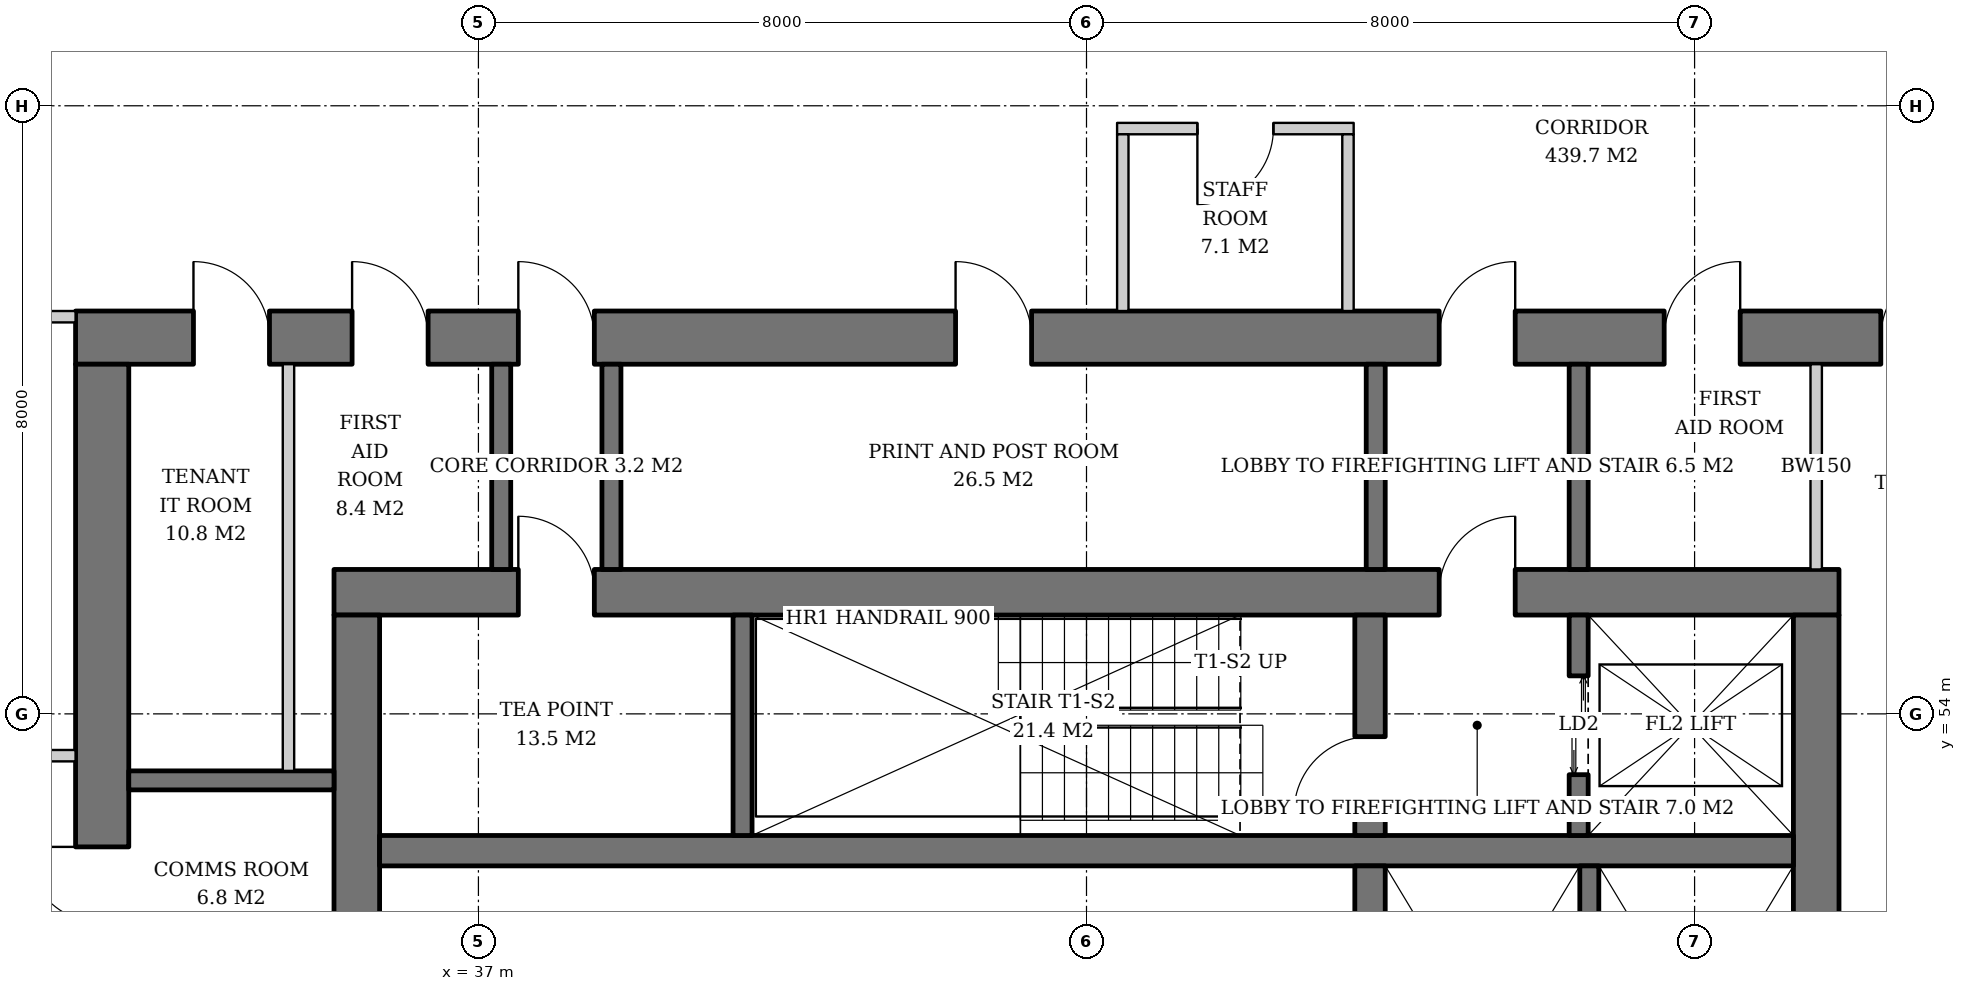
"""IFC4 building model, lengths in metres.
Left out: names, types, materials, properties, quantities, classifications, styles, units other than length and angle.
Written with IfcOpenShell. Run it as: python <this file> out.ifc"""

import sys

from ifc_helpers import new_model, si_unit, direction, frame, frame_2d, origin, place, context, subcontext, project, spatial, rectangle, extrude, element, fill, save


model = new_model("IFC4")
c1 = context("Model", 3, precision=1e-05, world=origin(), true_north=direction((0.0, 1.0)))
c2 = subcontext(c1, "Body", "Model", "MODEL_VIEW")
j1 = project(units=[si_unit("LENGTHUNIT", "METRE"), si_unit("PLANEANGLEUNIT", "RADIAN")], contexts=[c1])
p1 = place(None, origin())
s1 = spatial("IfcSite", under=j1, at=p1, CompositionType="ELEMENT")
p2 = place(p1, origin())
s2 = spatial("IfcBuilding", under=s1, at=p2, CompositionType="ELEMENT")
p3 = place(p2, frame((0.0, 0.0, 116.0)))
s3 = spatial("IfcBuildingStorey", under=s2, at=p3, CompositionType="ELEMENT", Elevation=116.0)
p4 = place(p3, frame((35.1, 55.6, 0.0), z_axis=(0.0, 0.0, 1.0), x_axis=(1.0, 0.0, 0.0)))
e1 = element("IfcWall", 1, at=p4, inside=s3, PredefinedType="SHEAR", context=c2, shape_type="SweptSolid", body=[
    extrude(rectangle(XDim=19.8, YDim=0.6, at=frame_2d((9.9, 0.0))), origin(), (0.0, 0.0, 1.0), 3.8),
])
p5 = place(p4, frame((14.54, 0.0, 0.0)))
e2 = element("IfcOpeningElement", 2, at=p5, cuts=e1, PredefinedType="OPENING", context=c2, shape_type="SweptSolid", body=[
    extrude(rectangle(XDim=1.0, YDim=2.1, at=frame_2d((0.5, 1.05))), frame((0.0, 0.31, 0.0), z_axis=(0.0, -1.0, 0.0), x_axis=(1.0, 0.0, 0.0)), (0.0, 0.0, 1.0), 0.62),
])
p6 = place(p4, frame((2.425, 0.0, 0.0)))
e3 = element("IfcOpeningElement", 3, at=p6, cuts=e1, PredefinedType="OPENING", context=c2, shape_type="SweptSolid", body=[
    extrude(rectangle(XDim=1.0, YDim=2.1, at=frame_2d((0.5, 1.05))), frame((0.0, 0.31, 0.0), z_axis=(0.0, -1.0, 0.0), x_axis=(1.0, 0.0, 0.0)), (0.0, 0.0, 1.0), 0.62),
])
p7 = place(p3, frame((35.4, 36.7, 0.0), z_axis=(0.0, 0.0, 1.0), x_axis=(0.0, 1.0, 0.0)))
e4 = element("IfcWall", 4, at=p7, inside=s3, PredefinedType="SHEAR", context=c2, shape_type="SweptSolid", body=[
    extrude(rectangle(XDim=18.6, YDim=0.6, at=frame_2d((9.3, 0.0))), origin(), (0.0, 0.0, 1.0), 3.8),
])
p8 = place(p7, frame((8.4, 0.0, 0.0)))
e5 = element("IfcOpeningElement", 5, at=p8, cuts=e4, PredefinedType="OPENING", context=c2, shape_type="SweptSolid", body=[
    extrude(rectangle(XDim=1.8, YDim=2.4, at=frame_2d((0.9, 1.2))), frame((0.0, 0.31, 0.0), z_axis=(0.0, -1.0, 0.0), x_axis=(1.0, 0.0, 0.0)), (0.0, 0.0, 1.0), 0.62),
])
p9 = place(p3, frame((54.6, 36.7, 0.0), z_axis=(0.0, 0.0, 1.0), x_axis=(0.0, 1.0, 0.0)))
e6 = element("IfcWall", 6, at=p9, inside=s3, PredefinedType="SHEAR", context=c2, shape_type="SweptSolid", body=[
    extrude(rectangle(XDim=18.6, YDim=0.6, at=frame_2d((9.3, 0.0))), origin(), (0.0, 0.0, 1.0), 3.8),
])
p10 = place(p9, frame((8.4, 0.0, 0.0)))
e7 = element("IfcOpeningElement", 7, at=p10, cuts=e6, PredefinedType="OPENING", context=c2, shape_type="SweptSolid", body=[
    extrude(rectangle(XDim=1.8, YDim=2.4, at=frame_2d((0.9, 1.2))), frame((0.0, 0.31, 0.0), z_axis=(0.0, -1.0, 0.0), x_axis=(1.0, 0.0, 0.0)), (0.0, 0.0, 1.0), 0.62),
])
p11 = place(p3, frame((31.7, 58.95, 0.0), z_axis=(0.0, 0.0, 1.0), x_axis=(1.0, 0.0, 0.0)))
e8 = element("IfcWall", 8, at=p11, inside=s3, PredefinedType="SHEAR", context=c2, shape_type="SweptSolid", body=[
    extrude(rectangle(XDim=26.6, YDim=0.7, at=frame_2d((13.3, 0.0))), origin(), (0.0, 0.0, 1.0), 3.8),
])
p12 = place(p11, frame((17.94, 0.0, 0.0)))
e9 = element("IfcOpeningElement", 9, at=p12, cuts=e8, PredefinedType="OPENING", context=c2, shape_type="SweptSolid", body=[
    extrude(rectangle(XDim=1.0, YDim=2.1, at=frame_2d((0.5, 1.05))), frame((0.0, 0.36, 0.0), z_axis=(0.0, -1.0, 0.0), x_axis=(1.0, 0.0, 0.0)), (0.0, 0.0, 1.0), 0.72),
])
p13 = place(p11, frame((5.825, 0.0, 0.0)))
e10 = element("IfcOpeningElement", 10, at=p13, cuts=e8, PredefinedType="OPENING", context=c2, shape_type="SweptSolid", body=[
    extrude(rectangle(XDim=1.0, YDim=2.1, at=frame_2d((0.5, 1.05))), frame((0.0, 0.36, 0.0), z_axis=(0.0, -1.0, 0.0), x_axis=(1.0, 0.0, 0.0)), (0.0, 0.0, 1.0), 0.72),
])
p14 = place(p11, frame((1.551, 0.0, 0.0)))
e11 = element("IfcOpeningElement", 11, at=p14, cuts=e8, PredefinedType="OPENING", context=c2, shape_type="SweptSolid", body=[
    extrude(rectangle(XDim=1.0, YDim=2.1, at=frame_2d((0.5, 1.05))), frame((0.0, 0.36, 0.0), z_axis=(0.0, -1.0, 0.0), x_axis=(1.0, 0.0, 0.0)), (0.0, 0.0, 1.0), 0.72),
])
p15 = place(p11, frame((3.638, 0.0, 0.0)))
e12 = element("IfcOpeningElement", 12, at=p15, cuts=e8, PredefinedType="OPENING", context=c2, shape_type="SweptSolid", body=[
    extrude(rectangle(XDim=1.0, YDim=2.1, at=frame_2d((0.5, 1.05))), frame((0.0, 0.36, 0.0), z_axis=(0.0, -1.0, 0.0), x_axis=(1.0, 0.0, 0.0)), (0.0, 0.0, 1.0), 0.72),
])
p16 = place(p11, frame((11.577, 0.0, 0.0)))
e13 = element("IfcOpeningElement", 13, at=p16, cuts=e8, PredefinedType="OPENING", context=c2, shape_type="SweptSolid", body=[
    extrude(rectangle(XDim=1.0, YDim=2.1, at=frame_2d((0.5, 1.05))), frame((0.0, 0.36, 0.0), z_axis=(0.0, -1.0, 0.0), x_axis=(1.0, 0.0, 0.0)), (0.0, 0.0, 1.0), 0.72),
])
p17 = place(p11, frame((20.9, 0.0, 0.0)))
e14 = element("IfcOpeningElement", 14, at=p17, cuts=e8, PredefinedType="OPENING", context=c2, shape_type="SweptSolid", body=[
    extrude(rectangle(XDim=1.0, YDim=2.1, at=frame_2d((0.5, 1.05))), frame((0.0, 0.36, 0.0), z_axis=(0.0, -1.0, 0.0), x_axis=(1.0, 0.0, 0.0)), (0.0, 0.0, 1.0), 0.72),
])
p18 = place(p11, frame((23.75, 0.0, 0.0)))
e15 = element("IfcOpeningElement", 15, at=p18, cuts=e8, PredefinedType="OPENING", context=c2, shape_type="SweptSolid", body=[
    extrude(rectangle(XDim=1.0, YDim=2.1, at=frame_2d((0.5, 1.05))), frame((0.0, 0.36, 0.0), z_axis=(0.0, -1.0, 0.0), x_axis=(1.0, 0.0, 0.0)), (0.0, 0.0, 1.0), 0.72),
])
p19 = place(p3, frame((32.05, 33.4, 0.0), z_axis=(0.0, 0.0, 1.0), x_axis=(0.0, 1.0, 0.0)))
e16 = element("IfcWall", 16, at=p19, inside=s3, PredefinedType="SHEAR", context=c2, shape_type="SweptSolid", body=[
    extrude(rectangle(XDim=25.2, YDim=0.7, at=frame_2d((12.6, 0.0))), origin(), (0.0, 0.0, 1.0), 3.8),
])
p20 = place(p19, frame((11.7, 0.0, 0.0)))
e17 = element("IfcOpeningElement", 17, at=p20, cuts=e16, PredefinedType="OPENING", context=c2, shape_type="SweptSolid", body=[
    extrude(rectangle(XDim=1.8, YDim=2.4, at=frame_2d((0.9, 1.2))), frame((0.0, 0.36, 0.0), z_axis=(0.0, -1.0, 0.0), x_axis=(1.0, 0.0, 0.0)), (0.0, 0.0, 1.0), 0.72),
])
p21 = place(p19, frame((3.6, 0.0, 0.0)))
e18 = element("IfcOpeningElement", 18, at=p21, cuts=e16, PredefinedType="OPENING", context=c2, shape_type="SweptSolid", body=[
    extrude(rectangle(XDim=1.0, YDim=2.1, at=frame_2d((0.5, 1.05))), frame((0.0, 0.36, 0.0), z_axis=(0.0, -1.0, 0.0), x_axis=(1.0, 0.0, 0.0)), (0.0, 0.0, 1.0), 0.72),
])
p22 = place(p19, frame((6.35, 0.0, 0.0)))
e19 = element("IfcOpeningElement", 19, at=p22, cuts=e16, PredefinedType="OPENING", context=c2, shape_type="SweptSolid", body=[
    extrude(rectangle(XDim=1.0, YDim=2.1, at=frame_2d((0.5, 1.05))), frame((0.0, 0.36, 0.0), z_axis=(0.0, -1.0, 0.0), x_axis=(1.0, 0.0, 0.0)), (0.0, 0.0, 1.0), 0.72),
])
p23 = place(p19, frame((9.1, 0.0, 0.0)))
e20 = element("IfcOpeningElement", 20, at=p23, cuts=e16, PredefinedType="OPENING", context=c2, shape_type="SweptSolid", body=[
    extrude(rectangle(XDim=1.0, YDim=2.1, at=frame_2d((0.5, 1.05))), frame((0.0, 0.36, 0.0), z_axis=(0.0, -1.0, 0.0), x_axis=(1.0, 0.0, 0.0)), (0.0, 0.0, 1.0), 0.72),
])
p24 = place(p19, frame((15.1, 0.0, 0.0)))
e21 = element("IfcOpeningElement", 21, at=p24, cuts=e16, PredefinedType="OPENING", context=c2, shape_type="SweptSolid", body=[
    extrude(rectangle(XDim=1.0, YDim=2.1, at=frame_2d((0.5, 1.05))), frame((0.0, 0.36, 0.0), z_axis=(0.0, -1.0, 0.0), x_axis=(1.0, 0.0, 0.0)), (0.0, 0.0, 1.0), 0.72),
])
p25 = place(p19, frame((17.85, 0.0, 0.0)))
e22 = element("IfcOpeningElement", 22, at=p25, cuts=e16, PredefinedType="OPENING", context=c2, shape_type="SweptSolid", body=[
    extrude(rectangle(XDim=1.0, YDim=2.1, at=frame_2d((0.5, 1.05))), frame((0.0, 0.36, 0.0), z_axis=(0.0, -1.0, 0.0), x_axis=(1.0, 0.0, 0.0)), (0.0, 0.0, 1.0), 0.72),
])
p26 = place(p3, frame((35.7, 52.2, 0.0), z_axis=(0.0, 0.0, 1.0), x_axis=(1.0, 0.0, 0.0)))
e23 = element("IfcWall", 23, at=p26, inside=s3, PredefinedType="SHEAR", context=c2, shape_type="SweptSolid", body=[
    extrude(rectangle(XDim=18.6, YDim=0.4, at=frame_2d((9.3, 0.0))), origin(), (0.0, 0.0, 1.0), 3.8),
])
p27 = place(p3, frame((48.73, 40.0, 0.0), z_axis=(0.0, 0.0, 1.0), x_axis=(0.0, 1.0, 0.0)))
e24 = element("IfcWall", 24, at=p27, inside=s3, PredefinedType="SHEAR", context=c2, shape_type="SweptSolid", body=[
    extrude(rectangle(XDim=12.0, YDim=0.4, at=frame_2d((6.0, 0.0))), origin(), (0.0, 0.0, 1.0), 3.8),
])
p28 = place(p3, frame((48.73, 52.4, 0.0), z_axis=(0.0, 0.0, 1.0), x_axis=(0.0, 1.0, 0.0)))
e25 = element("IfcWall", 25, at=p28, inside=s3, PredefinedType="SHEAR", context=c2, shape_type="SweptSolid", body=[
    extrude(rectangle(XDim=2.9, YDim=0.4, at=frame_2d((1.45, 0.0))), origin(), (0.0, 0.0, 1.0), 3.8),
])
p29 = place(p28, frame((0.3, 0.0, 0.0)))
e26 = element("IfcOpeningElement", 26, at=p29, cuts=e25, PredefinedType="OPENING", context=c2, shape_type="SweptSolid", body=[
    extrude(rectangle(XDim=1.0, YDim=2.1, at=frame_2d((0.5, 1.05))), frame((0.0, 0.21, 0.0), z_axis=(0.0, -1.0, 0.0), x_axis=(1.0, 0.0, 0.0)), (0.0, 0.0, 1.0), 0.42),
])
p30 = place(p3, frame((40.475, 52.4, 0.0), z_axis=(0.0, 0.0, 1.0), x_axis=(0.0, 1.0, 0.0)))
e27 = element("IfcWall", 27, at=p30, inside=s3, PredefinedType="SHEAR", context=c2, shape_type="SweptSolid", body=[
    extrude(rectangle(XDim=2.9, YDim=0.25, at=frame_2d((1.45, 0.0))), origin(), (0.0, 0.0, 1.0), 3.8),
])
p31 = place(p3, frame((51.475, 52.4, 0.0), z_axis=(0.0, 0.0, 1.0), x_axis=(0.0, 1.0, 0.0)))
e28 = element("IfcWall", 28, at=p31, inside=s3, PredefinedType="SHEAR", context=c2, shape_type="SweptSolid", body=[
    extrude(rectangle(XDim=2.9, YDim=0.25, at=frame_2d((1.45, 0.0))), origin(), (0.0, 0.0, 1.0), 3.8),
])
p32 = place(p31, frame((0.8, 0.0, 0.0)))
e29 = element("IfcOpeningElement", 29, at=p32, cuts=e28, PredefinedType="OPENING", context=c2, shape_type="SweptSolid", body=[
    extrude(rectangle(XDim=1.3, YDim=2.2, at=frame_2d((0.65, 1.1))), frame((0.0, 0.135, 0.0), z_axis=(0.0, -1.0, 0.0), x_axis=(1.0, 0.0, 0.0)), (0.0, 0.0, 1.0), 0.27),
])
p33 = place(p3, frame((51.615, 47.75, 0.0), z_axis=(0.0, 0.0, 1.0), x_axis=(0.0, 1.0, 0.0)))
e30 = element("IfcWall", 30, at=p33, inside=s3, PredefinedType="SHEAR", context=c2, shape_type="SweptSolid", body=[
    extrude(rectangle(XDim=4.25, YDim=0.25, at=frame_2d((2.125, 0.0))), origin(), (0.0, 0.0, 1.0), 3.8),
])
p34 = place(p3, frame((32.4, 53.125, 0.0), z_axis=(0.0, 0.0, 1.0), x_axis=(1.0, 0.0, 0.0)))
e31 = element("IfcWall", 31, at=p34, inside=s3, PredefinedType="SHEAR", context=c2, shape_type="SweptSolid", body=[
    extrude(rectangle(XDim=2.7, YDim=0.25, at=frame_2d((1.35, 0.0))), origin(), (0.0, 0.0, 1.0), 3.8),
])
for number, where, z_axis, x_axis in (
    (32, (48.805, 55.9, 0.0), (0.0, 0.0, 1.0), (0.0, 1.0, 0.0)),
    (33, (51.475, 55.9, 0.0), (0.0, 0.0, 1.0), (0.0, 1.0, 0.0)),
    (34, (37.3, 55.9, 0.0), (0.0, 0.0, 1.0), (0.0, 1.0, 0.0)),
    (35, (38.75, 55.9, 0.0), (0.0, 0.0, 1.0), (0.0, 1.0, 0.0)),
):
    element("IfcWall", number, at=place(p3, frame(where, z_axis=z_axis, x_axis=x_axis)), inside=s3, PredefinedType="SOLIDWALL", context=c2, shape_type="SweptSolid", body=[
        extrude(rectangle(XDim=2.7, YDim=0.25, at=frame_2d((1.35, 0.0))), origin(), (0.0, 0.0, 1.0), 3.62),
    ])
p35 = place(p3, frame((34.501, 53.25, 0.0), z_axis=(0.0, 0.0, 1.0), x_axis=(0.0, 1.0, 0.0)))
e36 = element("IfcWall", 36, at=p35, inside=s3, PredefinedType="SOLIDWALL", context=c2, shape_type="SweptSolid", body=[
    extrude(rectangle(XDim=5.35, YDim=0.15, at=frame_2d((2.675, 0.0))), origin(), (0.0, 0.0, 1.0), 3.62),
])
p36 = place(p3, frame((54.6, 55.9, 0.0), z_axis=(0.0, 0.0, 1.0), x_axis=(0.0, 1.0, 0.0)))
e37 = element("IfcWall", 37, at=p36, inside=s3, PredefinedType="SOLIDWALL", context=c2, shape_type="SweptSolid", body=[
    extrude(rectangle(XDim=2.7, YDim=0.15, at=frame_2d((1.35, 0.0))), origin(), (0.0, 0.0, 1.0), 3.62),
])
p37 = place(p3, frame((48.515, 61.7, 0.0), z_axis=(0.0, 0.0, 1.0), x_axis=(-1.0, 0.0, 0.0)))
e38 = element("IfcWall", 38, at=p37, inside=s3, PredefinedType="PARTITIONING", context=c2, shape_type="SweptSolid", body=[
    extrude(rectangle(XDim=3.112, YDim=0.15, at=frame_2d((1.556, 0.0))), origin(), (0.0, 0.0, 1.0), 2.858),
])
p38 = place(p37, frame((1.056, 0.0, 0.0)))
e39 = element("IfcOpeningElement", 39, at=p38, cuts=e38, PredefinedType="OPENING", context=c2, shape_type="SweptSolid", body=[
    extrude(rectangle(XDim=1.0, YDim=2.1, at=frame_2d((0.5, 1.05))), frame((0.0, 0.085, 0.0), z_axis=(0.0, -1.0, 0.0), x_axis=(1.0, 0.0, 0.0)), (0.0, 0.0, 1.0), 0.17),
])
p39 = place(p3, frame((48.44, 59.3, 0.0), z_axis=(0.0, 0.0, 1.0), x_axis=(0.0, 1.0, 0.0)))
e40 = element("IfcWall", 40, at=p39, inside=s3, PredefinedType="PARTITIONING", context=c2, shape_type="SweptSolid", body=[
    extrude(rectangle(XDim=2.325, YDim=0.15, at=frame_2d((1.163, 0.0))), origin(), (0.0, 0.0, 1.0), 3.62),
])
p40 = place(p3, frame((45.478, 59.3, 0.0), z_axis=(0.0, 0.0, 1.0), x_axis=(0.0, 1.0, 0.0)))
e41 = element("IfcWall", 41, at=p40, inside=s3, PredefinedType="PARTITIONING", context=c2, shape_type="SweptSolid", body=[
    extrude(rectangle(XDim=2.325, YDim=0.15, at=frame_2d((1.163, 0.0))), origin(), (0.0, 0.0, 1.0), 2.858),
])
for number, where, z_axis, x_axis in (
    (42, (31.7, 59.225, 0.0), (0.0, 0.0, 1.0), (-1.0, 0.0, 0.0)),
    (43, (31.7, 53.45, 0.0), (0.0, 0.0, 1.0), (-1.0, 0.0, 0.0)),
):
    element("IfcWall", number, at=place(p3, frame(where, z_axis=z_axis, x_axis=x_axis)), inside=s3, PredefinedType="PARTITIONING", context=c2, shape_type="SweptSolid", body=[
        extrude(rectangle(XDim=2.325, YDim=0.15, at=frame_2d((1.163, 0.0))), origin(), (0.0, 0.0, 1.0), 3.62),
    ])
p41 = place(p32, origin())
e44 = element("IfcDoor", 44, at=p41, inside=s3, OperationType="DOUBLE_DOOR_SLIDING", PredefinedType="DOOR", context=c2, shape_type="SweptSolid", body=[
    extrude(rectangle(XDim=1.3, YDim=2.2, at=frame_2d((0.65, 1.1))), frame((0.0, 0.025, 0.0), z_axis=(0.0, -1.0, 0.0), x_axis=(1.0, 0.0, 0.0)), (0.0, 0.0, 1.0), 0.05),
])
fill(e29, e44)
p42 = place(p29, origin())
e45 = element("IfcDoor", 45, at=p42, inside=s3, OperationType="SINGLE_SWING_LEFT", PredefinedType="DOOR", context=c2, shape_type="SweptSolid", body=[
    extrude(rectangle(XDim=1.0, YDim=2.1, at=frame_2d((0.5, 1.05))), frame((0.0, 0.025, 0.0), z_axis=(0.0, -1.0, 0.0), x_axis=(1.0, 0.0, 0.0)), (0.0, 0.0, 1.0), 0.05),
])
fill(e26, e45)
p43 = place(p5, origin())
e46 = element("IfcDoor", 46, at=p43, inside=s3, OperationType="SINGLE_SWING_RIGHT", PredefinedType="DOOR", context=c2, shape_type="SweptSolid", body=[
    extrude(rectangle(XDim=1.0, YDim=2.1, at=frame_2d((0.5, 1.05))), frame((0.0, 0.025, 0.0), z_axis=(0.0, -1.0, 0.0), x_axis=(1.0, 0.0, 0.0)), (0.0, 0.0, 1.0), 0.05),
])
fill(e2, e46)
p44 = place(p12, origin())
e47 = element("IfcDoor", 47, at=p44, inside=s3, OperationType="SINGLE_SWING_RIGHT", PredefinedType="DOOR", context=c2, shape_type="SweptSolid", body=[
    extrude(rectangle(XDim=1.0, YDim=2.1, at=frame_2d((0.5, 1.05))), frame((0.0, 0.025, 0.0), z_axis=(0.0, -1.0, 0.0), x_axis=(1.0, 0.0, 0.0)), (0.0, 0.0, 1.0), 0.05),
])
fill(e9, e47)
p45 = place(p13, origin())
e48 = element("IfcDoor", 48, at=p45, inside=s3, OperationType="SINGLE_SWING_LEFT", PredefinedType="DOOR", context=c2, shape_type="SweptSolid", body=[
    extrude(rectangle(XDim=1.0, YDim=2.1, at=frame_2d((0.5, 1.05))), frame((0.0, 0.025, 0.0), z_axis=(0.0, -1.0, 0.0), x_axis=(1.0, 0.0, 0.0)), (0.0, 0.0, 1.0), 0.05),
])
fill(e10, e48)
p46 = place(p6, origin())
e49 = element("IfcDoor", 49, at=p46, inside=s3, OperationType="SINGLE_SWING_LEFT", PredefinedType="DOOR", context=c2, shape_type="SweptSolid", body=[
    extrude(rectangle(XDim=1.0, YDim=2.1, at=frame_2d((0.5, 1.05))), frame((0.0, -0.24, 0.0), z_axis=(0.0, -1.0, 0.0), x_axis=(1.0, 0.0, 0.0)), (0.0, 0.0, 1.0), 0.05),
])
fill(e3, e49)
p47 = place(p25, origin())
e50 = element("IfcDoor", 50, at=p47, inside=s3, OperationType="SINGLE_SWING_RIGHT", PredefinedType="DOOR", context=c2, shape_type="SweptSolid", body=[
    extrude(rectangle(XDim=1.0, YDim=2.1, at=frame_2d((0.5, 1.05))), frame((0.0, -0.29, 0.0), z_axis=(0.0, -1.0, 0.0), x_axis=(1.0, 0.0, 0.0)), (0.0, 0.0, 1.0), 0.05),
])
fill(e22, e50)
p48 = place(p14, origin())
e51 = element("IfcDoor", 51, at=p48, inside=s3, OperationType="SINGLE_SWING_LEFT", PredefinedType="DOOR", context=c2, shape_type="SweptSolid", body=[
    extrude(rectangle(XDim=1.0, YDim=2.1, at=frame_2d((0.5, 1.05))), frame((0.0, -0.29, 0.0), z_axis=(0.0, -1.0, 0.0), x_axis=(1.0, 0.0, 0.0)), (0.0, 0.0, 1.0), 0.05),
])
fill(e11, e51)
p49 = place(p15, origin())
e52 = element("IfcDoor", 52, at=p49, inside=s3, OperationType="SINGLE_SWING_LEFT", PredefinedType="DOOR", context=c2, shape_type="SweptSolid", body=[
    extrude(rectangle(XDim=1.0, YDim=2.1, at=frame_2d((0.5, 1.05))), frame((0.0, -0.29, 0.0), z_axis=(0.0, -1.0, 0.0), x_axis=(1.0, 0.0, 0.0)), (0.0, 0.0, 1.0), 0.05),
])
fill(e12, e52)
p50 = place(p16, origin())
e53 = element("IfcDoor", 53, at=p50, inside=s3, OperationType="SINGLE_SWING_LEFT", PredefinedType="DOOR", context=c2, shape_type="SweptSolid", body=[
    extrude(rectangle(XDim=1.0, YDim=2.1, at=frame_2d((0.5, 1.05))), frame((0.0, -0.29, 0.0), z_axis=(0.0, -1.0, 0.0), x_axis=(1.0, 0.0, 0.0)), (0.0, 0.0, 1.0), 0.05),
])
fill(e13, e53)
p51 = place(p17, origin())
e54 = element("IfcDoor", 54, at=p51, inside=s3, OperationType="SINGLE_SWING_RIGHT", PredefinedType="DOOR", context=c2, shape_type="SweptSolid", body=[
    extrude(rectangle(XDim=1.0, YDim=2.1, at=frame_2d((0.5, 1.05))), frame((0.0, -0.29, 0.0), z_axis=(0.0, -1.0, 0.0), x_axis=(1.0, 0.0, 0.0)), (0.0, 0.0, 1.0), 0.05),
])
fill(e14, e54)
p52 = place(p18, origin())
e55 = element("IfcDoor", 55, at=p52, inside=s3, OperationType="SINGLE_SWING_RIGHT", PredefinedType="DOOR", context=c2, shape_type="SweptSolid", body=[
    extrude(rectangle(XDim=1.0, YDim=2.1, at=frame_2d((0.5, 1.05))), frame((0.0, -0.29, 0.0), z_axis=(0.0, -1.0, 0.0), x_axis=(1.0, 0.0, 0.0)), (0.0, 0.0, 1.0), 0.05),
])
fill(e15, e55)
p53 = place(p38, origin())
e56 = element("IfcDoor", 56, at=p53, inside=s3, OperationType="SINGLE_SWING_RIGHT", PredefinedType="DOOR", context=c2, shape_type="SweptSolid", body=[
    extrude(rectangle(XDim=1.0, YDim=2.1, at=frame_2d((0.5, 1.05))), frame((0.0, 0.025, 0.0), z_axis=(0.0, -1.0, 0.0), x_axis=(1.0, 0.0, 0.0)), (0.0, 0.0, 1.0), 0.05),
])
fill(e39, e56)
save(model, sys.argv[1])
